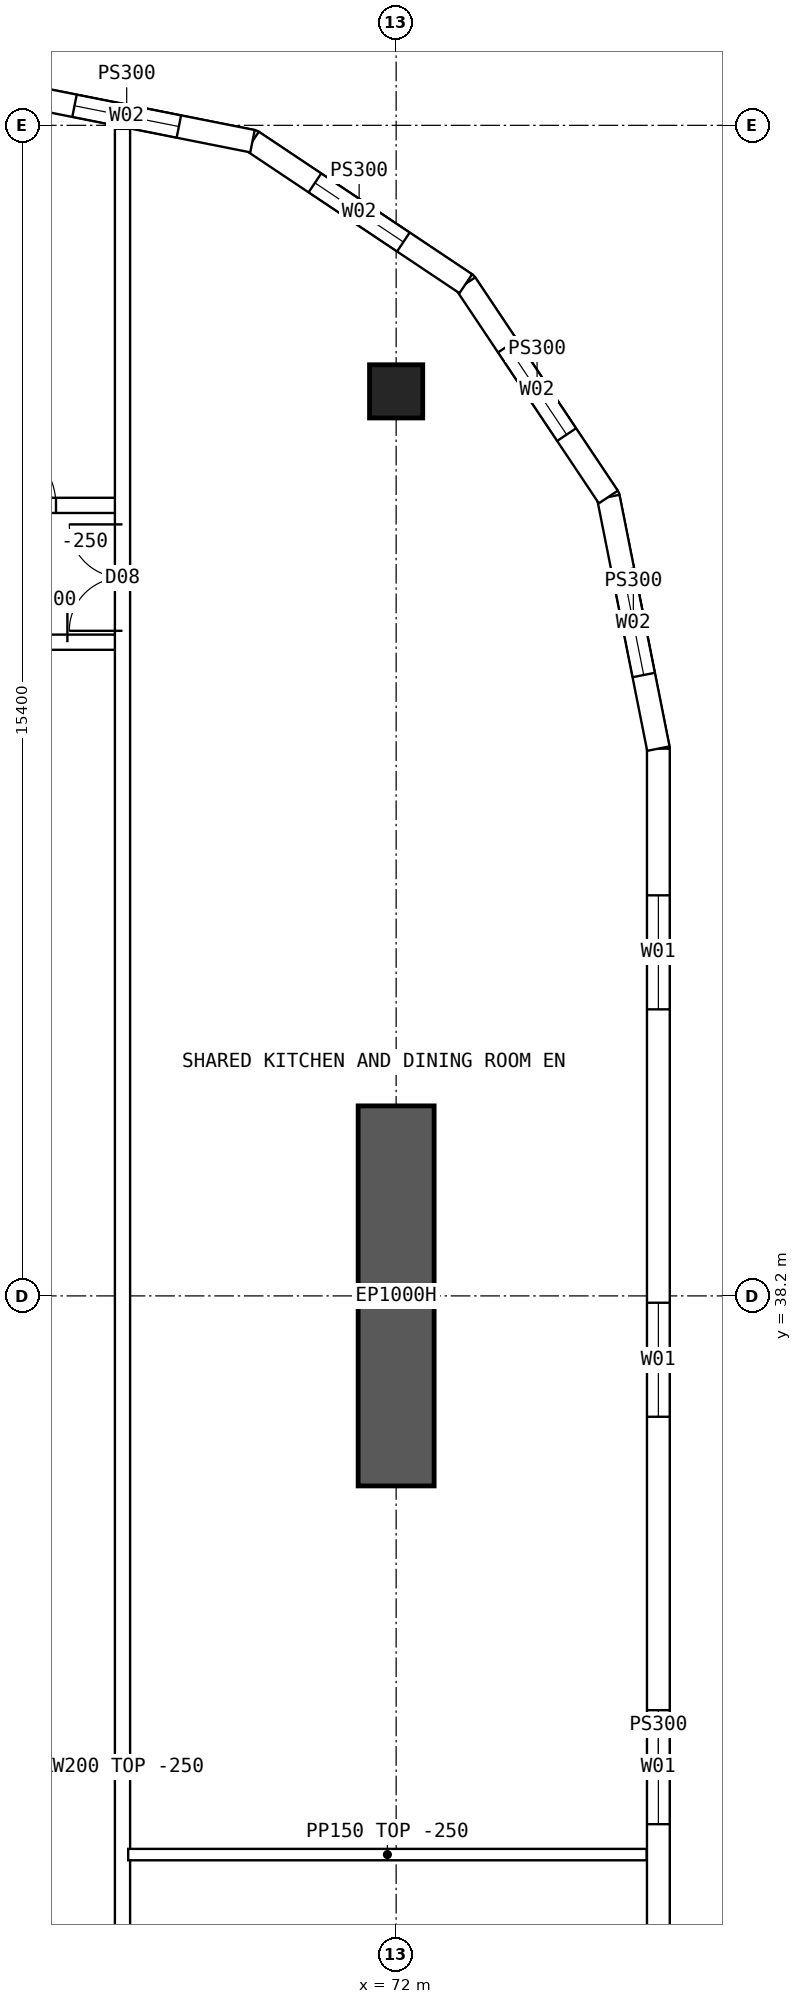
"""IFC4 building model, lengths in metres.
Left out: names, types, materials, properties, quantities, classifications, styles, units other than length and angle.
Written with IfcOpenShell. Run it as: python <this file> out.ifc"""

import sys

from ifc_helpers import new_model, si_unit, direction, frame, frame_2d, origin, origin_2d, place, context, subcontext, project, spatial, polyline, rectangle, hollow_rectangle, outline, extrude, element, fill, save


model = new_model("IFC4")
c1 = context("Model", 3, precision=1e-05, world=origin(), true_north=direction((0.0, 1.0)))
c2 = subcontext(c1, "Body", "Model", "MODEL_VIEW")
j1 = project(units=[si_unit("LENGTHUNIT", "METRE"), si_unit("PLANEANGLEUNIT", "RADIAN")], contexts=[c1])
p1 = place(None, origin())
s1 = spatial("IfcSite", under=j1, at=p1, CompositionType="ELEMENT")
p2 = place(p1, origin())
s2 = spatial("IfcBuilding", under=s1, at=p2, CompositionType="ELEMENT")
p3 = place(p2, frame((0.0, 0.0, 178.6)))
s3 = spatial("IfcBuildingStorey", under=s2, at=p3, CompositionType="ELEMENT", Elevation=178.6)
p4 = place(p3, frame((72.0, 50.1, 0.0), z_axis=(0.0, 0.0, 1.0), x_axis=(1.0, 0.0, 0.0)))
e1 = element("IfcColumn", 1, at=p4, inside=s3, PredefinedType="COLUMN", context=c2, shape_type="SweptSolid", body=[
    extrude(hollow_rectangle(XDim=0.7, YDim=0.7, WallThickness=0.07, at=origin_2d()), origin(), (0.0, 0.0, 1.0), 3.75),
])
p5 = place(p3, frame((72.0, 35.7, 0.0), z_axis=(0.0, 0.0, 1.0), x_axis=(0.0, 1.0, 0.0)))
e2 = element("IfcWall", 2, at=p5, inside=s3, PredefinedType="SHEAR", context=c2, shape_type="SweptSolid", body=[
    extrude(rectangle(XDim=5.0, YDim=1.0, at=frame_2d((2.5, 0.0))), origin(), (0.0, 0.0, 1.0), 3.75),
])
p6 = place(p3, frame((75.45, 18.6, 0.0), z_axis=(0.0, 0.0, 1.0), x_axis=(0.0, 1.0, 0.0)))
e3 = element("IfcWall", 3, at=p6, inside=s3, PredefinedType="SOLIDWALL", context=c2, shape_type="SweptSolid", body=[
    extrude(outline(polyline([(-0.015, -0.15), (26.815, -0.15), (26.785, 0.15), (0.015, 0.15), (-0.015, -0.15)])), origin(), (0.0, 0.0, 1.0), 3.5),
])
p7 = place(p6, frame((1.93, 0.0, 0.9)))
e4 = element("IfcOpeningElement", 4, at=p7, cuts=e3, PredefinedType="OPENING", context=c2, shape_type="SweptSolid", body=[
    extrude(rectangle(XDim=1.5, YDim=2.0, at=frame_2d((0.75, 1.0))), frame((0.0, 0.16, 0.0), z_axis=(0.0, -1.0, 0.0), x_axis=(1.0, 0.0, 0.0)), (0.0, 0.0, 1.0), 0.32),
])
p8 = place(p6, frame((7.29, 0.0, 0.9)))
e5 = element("IfcOpeningElement", 5, at=p8, cuts=e3, PredefinedType="OPENING", context=c2, shape_type="SweptSolid", body=[
    extrude(rectangle(XDim=1.5, YDim=2.0, at=frame_2d((0.75, 1.0))), frame((0.0, 0.16, 0.0), z_axis=(0.0, -1.0, 0.0), x_axis=(1.0, 0.0, 0.0)), (0.0, 0.0, 1.0), 0.32),
])
p9 = place(p6, frame((12.65, 0.0, 0.9)))
e6 = element("IfcOpeningElement", 6, at=p9, cuts=e3, PredefinedType="OPENING", context=c2, shape_type="SweptSolid", body=[
    extrude(rectangle(XDim=1.5, YDim=2.0, at=frame_2d((0.75, 1.0))), frame((0.0, 0.16, 0.0), z_axis=(0.0, -1.0, 0.0), x_axis=(1.0, 0.0, 0.0)), (0.0, 0.0, 1.0), 0.32),
])
p10 = place(p6, frame((18.01, 0.0, 0.9)))
e7 = element("IfcOpeningElement", 7, at=p10, cuts=e3, PredefinedType="OPENING", context=c2, shape_type="SweptSolid", body=[
    extrude(rectangle(XDim=1.5, YDim=2.0, at=frame_2d((0.75, 1.0))), frame((0.0, 0.16, 0.0), z_axis=(0.0, -1.0, 0.0), x_axis=(1.0, 0.0, 0.0)), (0.0, 0.0, 1.0), 0.32),
])
p11 = place(p6, frame((23.37, 0.0, 0.9)))
e8 = element("IfcOpeningElement", 8, at=p11, cuts=e3, PredefinedType="OPENING", context=c2, shape_type="SweptSolid", body=[
    extrude(rectangle(XDim=1.5, YDim=2.0, at=frame_2d((0.75, 1.0))), frame((0.0, 0.16, 0.0), z_axis=(0.0, -1.0, 0.0), x_axis=(1.0, 0.0, 0.0)), (0.0, 0.0, 1.0), 0.32),
])
p12 = place(p3, frame((75.45, 45.4, 0.0), z_axis=(0.0, 0.0, 1.0), x_axis=(-0.19508664885, 0.980786011034, 0.0)))
e9 = element("IfcWall", 9, at=p12, inside=s3, PredefinedType="SOLIDWALL", context=c2, shape_type="SweptSolid", body=[
    extrude(outline(polyline([(-0.015, -0.15), (3.405, -0.15), (3.345, 0.15), (0.015, 0.15), (-0.015, -0.15)])), origin(), (0.0, 0.0, 1.0), 3.5),
])
p13 = place(p12, frame((0.988, 0.0, 0.9)))
e10 = element("IfcOpeningElement", 10, at=p13, cuts=e9, PredefinedType="OPENING", context=c2, shape_type="SweptSolid", body=[
    extrude(rectangle(XDim=1.4, YDim=1.8, at=frame_2d((0.7, 0.9))), frame((0.0, 0.16, 0.0), z_axis=(0.0, -1.0, 0.0), x_axis=(1.0, 0.0, 0.0)), (0.0, 0.0, 1.0), 0.32),
])
p14 = place(p3, frame((74.792, 48.71, 0.0), z_axis=(0.0, 0.0, 1.0), x_axis=(-0.555534554399, 0.831493450887, 0.0)))
e11 = element("IfcWall", 11, at=p14, inside=s3, PredefinedType="SOLIDWALL", context=c2, shape_type="SweptSolid", body=[
    extrude(outline(polyline([(-0.03, -0.15), (3.405, -0.15), (3.345, 0.15), (0.03, 0.15), (-0.03, -0.15)])), origin(), (0.0, 0.0, 1.0), 3.5),
])
p15 = place(p14, frame((0.988, 0.0, 0.9)))
e12 = element("IfcOpeningElement", 12, at=p15, cuts=e11, PredefinedType="OPENING", context=c2, shape_type="SweptSolid", body=[
    extrude(rectangle(XDim=1.4, YDim=1.8, at=frame_2d((0.7, 0.9))), frame((0.0, 0.16, 0.0), z_axis=(0.0, -1.0, 0.0), x_axis=(1.0, 0.0, 0.0)), (0.0, 0.0, 1.0), 0.32),
])
p16 = place(p3, frame((72.917, 51.517, 0.0), z_axis=(0.0, 0.0, 1.0), x_axis=(-0.831493450887, 0.555534554399, 0.0)))
e13 = element("IfcWall", 13, at=p16, inside=s3, PredefinedType="SOLIDWALL", context=c2, shape_type="SweptSolid", body=[
    extrude(outline(polyline([(-0.03, -0.15), (3.405, -0.15), (3.345, 0.15), (0.03, 0.15), (-0.03, -0.15)])), origin(), (0.0, 0.0, 1.0), 3.5),
])
p17 = place(p16, frame((0.988, 0.0, 0.9)))
e14 = element("IfcOpeningElement", 14, at=p17, cuts=e13, PredefinedType="OPENING", context=c2, shape_type="SweptSolid", body=[
    extrude(rectangle(XDim=1.4, YDim=1.8, at=frame_2d((0.7, 0.9))), frame((0.0, 0.16, 0.0), z_axis=(0.0, -1.0, 0.0), x_axis=(1.0, 0.0, 0.0)), (0.0, 0.0, 1.0), 0.32),
])
p18 = place(p3, frame((70.11, 53.392, 0.0), z_axis=(0.0, 0.0, 1.0), x_axis=(-0.98078325777, 0.195100490205, 0.0)))
e15 = element("IfcWall", 15, at=p18, inside=s3, PredefinedType="SOLIDWALL", context=c2, shape_type="SweptSolid", body=[
    extrude(outline(polyline([(-0.03, -0.15), (3.405, -0.15), (3.345, 0.15), (0.03, 0.15), (-0.03, -0.15)])), origin(), (0.0, 0.0, 1.0), 3.5),
])
p19 = place(p18, frame((0.988, 0.0, 0.9)))
e16 = element("IfcOpeningElement", 16, at=p19, cuts=e15, PredefinedType="OPENING", context=c2, shape_type="SweptSolid", body=[
    extrude(rectangle(XDim=1.4, YDim=1.8, at=frame_2d((0.7, 0.9))), frame((0.0, 0.16, 0.0), z_axis=(0.0, -1.0, 0.0), x_axis=(1.0, 0.0, 0.0)), (0.0, 0.0, 1.0), 0.32),
])
p20 = place(p3, frame((66.425, 48.6, 0.0), z_axis=(0.0, 0.0, 1.0), x_axis=(1.0, 0.0, 0.0)))
e17 = element("IfcWall", 17, at=p20, inside=s3, PredefinedType="SOLIDWALL", context=c2, shape_type="SweptSolid", body=[
    extrude(rectangle(XDim=1.975, YDim=0.2, at=frame_2d((0.987, 0.0))), origin(), (0.0, 0.0, 1.0), 3.5),
])
p21 = place(p20, frame((0.2, 0.0, 0.0)))
e18 = element("IfcOpeningElement", 18, at=p21, cuts=e17, PredefinedType="OPENING", context=c2, shape_type="SweptSolid", body=[
    extrude(rectangle(XDim=0.9, YDim=2.1, at=frame_2d((0.45, 1.05))), frame((0.0, 0.11, 0.0), z_axis=(0.0, -1.0, 0.0), x_axis=(1.0, 0.0, 0.0)), (0.0, 0.0, 1.0), 0.22),
])
p22 = place(p3, frame((66.425, 46.8, 0.0), z_axis=(0.0, 0.0, 1.0), x_axis=(1.0, 0.0, 0.0)))
e19 = element("IfcWall", 19, at=p22, inside=s3, PredefinedType="SOLIDWALL", context=c2, shape_type="SweptSolid", body=[
    extrude(rectangle(XDim=1.975, YDim=0.2, at=frame_2d((0.987, 0.0))), origin(), (0.0, 0.0, 1.0), 3.5),
])
p23 = place(p22, frame((0.05, 0.0, 0.0)))
e20 = element("IfcOpeningElement", 20, at=p23, cuts=e19, PredefinedType="OPENING", context=c2, shape_type="SweptSolid", body=[
    extrude(rectangle(XDim=1.2, YDim=2.1, at=frame_2d((0.6, 1.05))), frame((0.0, 0.11, 0.0), z_axis=(0.0, -1.0, 0.0), x_axis=(1.0, 0.0, 0.0)), (0.0, 0.0, 1.0), 0.22),
])
p24 = place(p3, frame((68.475, 30.85, 0.0), z_axis=(0.0, 0.0, 1.0), x_axis=(1.0, 0.0, 0.0)))
e21 = element("IfcWall", 21, at=p24, inside=s3, PredefinedType="PARTITIONING", context=c2, shape_type="SweptSolid", body=[
    extrude(outline(polyline([(0.0, 0.0), (6.82, 0.0), (6.82, 3.5), (3.827, 3.5), (3.825, 3.05), (3.227, 3.05), (3.225, 3.5), (0.0, 3.5), (0.0, 0.0)])), frame((0.0, 0.075, 0.0), z_axis=(0.0, -1.0, 0.0), x_axis=(1.0, 0.0, 0.0)), (0.0, 0.0, 1.0), 0.15),
])
p25 = place(p3, frame((68.4, 10.446, 0.0), z_axis=(0.0, 0.0, 1.0), x_axis=(0.0, 1.0, 0.0)))
e22 = element("IfcWall", 22, at=p25, inside=s3, PredefinedType="SOLIDWALL", context=c2, shape_type="SweptSolid", body=[
    extrude(rectangle(XDim=43.107, YDim=0.2, at=frame_2d((21.554, 0.0))), origin(), (0.0, 0.0, 1.0), 3.5),
])
p26 = place(p25, frame((5.104, 0.0, 0.0)))
e23 = element("IfcOpeningElement", 23, at=p26, cuts=e22, PredefinedType="OPENING", context=c2, shape_type="SweptSolid", body=[
    extrude(rectangle(XDim=1.4, YDim=2.1, at=frame_2d((0.7, 1.05))), frame((0.0, 0.11, 0.0), z_axis=(0.0, -1.0, 0.0), x_axis=(1.0, 0.0, 0.0)), (0.0, 0.0, 1.0), 0.22),
])
p27 = place(p25, frame((36.504, 0.0, 0.0)))
e24 = element("IfcOpeningElement", 24, at=p27, cuts=e22, PredefinedType="OPENING", context=c2, shape_type="SweptSolid", body=[
    extrude(rectangle(XDim=1.4, YDim=2.1, at=frame_2d((0.7, 1.05))), frame((0.0, 0.11, 0.0), z_axis=(0.0, -1.0, 0.0), x_axis=(1.0, 0.0, 0.0)), (0.0, 0.0, 1.0), 0.22),
])
p28 = place(p9, origin())
e25 = element("IfcWindow", 25, at=p28, inside=s3, PartitioningType="SINGLE_PANEL", PredefinedType="WINDOW", context=c2, shape_type="SweptSolid", body=[
    extrude(rectangle(XDim=1.5, YDim=2.0, at=frame_2d((0.75, 1.0))), frame((0.0, 0.03, 0.0), z_axis=(0.0, -1.0, 0.0), x_axis=(1.0, 0.0, 0.0)), (0.0, 0.0, 1.0), 0.06),
])
fill(e6, e25)
p29 = place(p10, origin())
e26 = element("IfcWindow", 26, at=p29, inside=s3, PartitioningType="SINGLE_PANEL", PredefinedType="WINDOW", context=c2, shape_type="SweptSolid", body=[
    extrude(rectangle(XDim=1.5, YDim=2.0, at=frame_2d((0.75, 1.0))), frame((0.0, 0.03, 0.0), z_axis=(0.0, -1.0, 0.0), x_axis=(1.0, 0.0, 0.0)), (0.0, 0.0, 1.0), 0.06),
])
fill(e7, e26)
p30 = place(p11, origin())
e27 = element("IfcWindow", 27, at=p30, inside=s3, PartitioningType="SINGLE_PANEL", PredefinedType="WINDOW", context=c2, shape_type="SweptSolid", body=[
    extrude(rectangle(XDim=1.5, YDim=2.0, at=frame_2d((0.75, 1.0))), frame((0.0, 0.03, 0.0), z_axis=(0.0, -1.0, 0.0), x_axis=(1.0, 0.0, 0.0)), (0.0, 0.0, 1.0), 0.06),
])
fill(e8, e27)
p31 = place(p13, origin())
e28 = element("IfcWindow", 28, at=p31, inside=s3, PartitioningType="SINGLE_PANEL", PredefinedType="WINDOW", context=c2, shape_type="SweptSolid", body=[
    extrude(rectangle(XDim=1.4, YDim=1.8, at=frame_2d((0.7, 0.9))), frame((0.0, 0.03, 0.0), z_axis=(0.0, -1.0, 0.0), x_axis=(1.0, 0.0, 0.0)), (0.0, 0.0, 1.0), 0.06),
])
fill(e10, e28)
p32 = place(p15, origin())
e29 = element("IfcWindow", 29, at=p32, inside=s3, PartitioningType="SINGLE_PANEL", PredefinedType="WINDOW", context=c2, shape_type="SweptSolid", body=[
    extrude(rectangle(XDim=1.4, YDim=1.8, at=frame_2d((0.7, 0.9))), frame((0.0, 0.03, 0.0), z_axis=(0.0, -1.0, 0.0), x_axis=(1.0, 0.0, 0.0)), (0.0, 0.0, 1.0), 0.06),
])
fill(e12, e29)
p33 = place(p17, origin())
e30 = element("IfcWindow", 30, at=p33, inside=s3, PartitioningType="SINGLE_PANEL", PredefinedType="WINDOW", context=c2, shape_type="SweptSolid", body=[
    extrude(rectangle(XDim=1.4, YDim=1.8, at=frame_2d((0.7, 0.9))), frame((0.0, 0.03, 0.0), z_axis=(0.0, -1.0, 0.0), x_axis=(1.0, 0.0, 0.0)), (0.0, 0.0, 1.0), 0.06),
])
fill(e14, e30)
p34 = place(p19, origin())
e31 = element("IfcWindow", 31, at=p34, inside=s3, PartitioningType="SINGLE_PANEL", PredefinedType="WINDOW", context=c2, shape_type="SweptSolid", body=[
    extrude(rectangle(XDim=1.4, YDim=1.8, at=frame_2d((0.7, 0.9))), frame((0.0, 0.03, 0.0), z_axis=(0.0, -1.0, 0.0), x_axis=(1.0, 0.0, 0.0)), (0.0, 0.0, 1.0), 0.06),
])
fill(e16, e31)
p35 = place(p23, origin())
e32 = element("IfcDoor", 32, at=p35, inside=s3, OperationType="DOUBLE_DOOR_SINGLE_SWING", PredefinedType="DOOR", context=c2, shape_type="SweptSolid", body=[
    extrude(rectangle(XDim=1.2, YDim=2.1, at=frame_2d((0.6, 1.05))), frame((0.0, 0.025, 0.0), z_axis=(0.0, -1.0, 0.0), x_axis=(1.0, 0.0, 0.0)), (0.0, 0.0, 1.0), 0.05),
])
fill(e20, e32)
p36 = place(p27, origin())
e33 = element("IfcDoor", 33, at=p36, inside=s3, OperationType="DOUBLE_DOOR_SINGLE_SWING", PredefinedType="DOOR", context=c2, shape_type="SweptSolid", body=[
    extrude(rectangle(XDim=1.4, YDim=2.1, at=frame_2d((0.7, 1.05))), frame((0.0, 0.025, 0.0), z_axis=(0.0, -1.0, 0.0), x_axis=(1.0, 0.0, 0.0)), (0.0, 0.0, 1.0), 0.05),
])
fill(e24, e33)
p37 = place(p21, origin())
e34 = element("IfcDoor", 34, at=p37, inside=s3, OperationType="SINGLE_SWING_LEFT", PredefinedType="DOOR", context=c2, shape_type="SweptSolid", body=[
    extrude(rectangle(XDim=0.9, YDim=2.1, at=frame_2d((0.45, 1.05))), frame((0.0, 0.025, 0.0), z_axis=(0.0, -1.0, 0.0), x_axis=(1.0, 0.0, 0.0)), (0.0, 0.0, 1.0), 0.05),
])
fill(e18, e34)
save(model, sys.argv[1])
